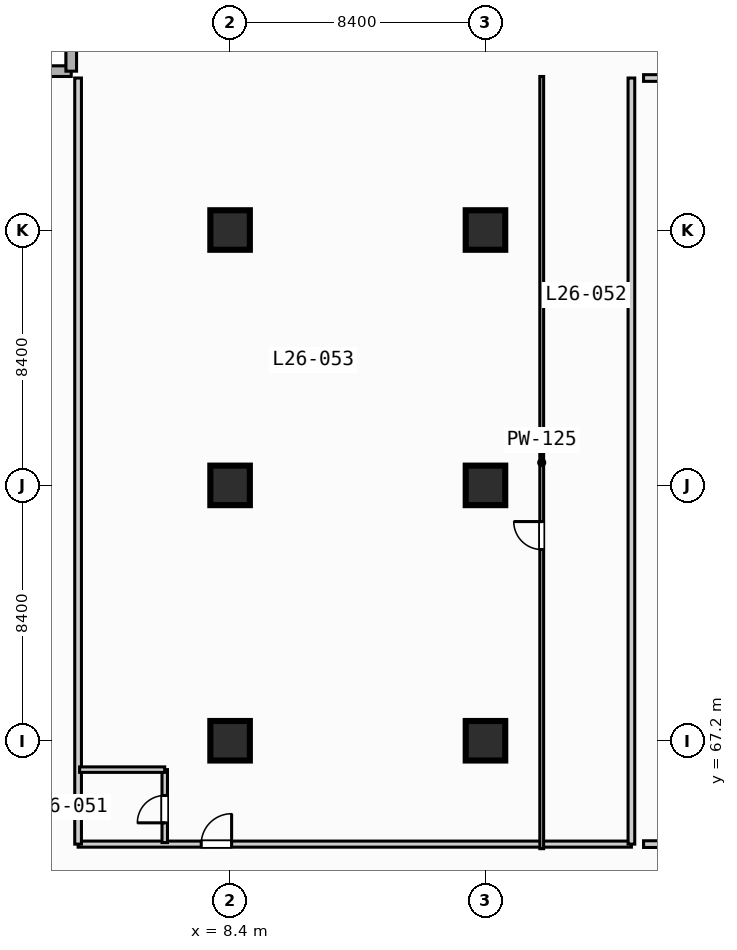
"""IFC4 building model, lengths in metres.
Left out: names, types, materials, properties, quantities, classifications, styles, units other than length and angle.
Written with IfcOpenShell. Run it as: python <this file> out.ifc"""

import sys

from ifc_helpers import new_model, si_unit, direction, frame, frame_2d, origin, origin_2d, place, context, subcontext, project, spatial, rectangle, extrude, element, fill, save


model = new_model("IFC4")
c1 = context("Model", 3, precision=1e-05, world=origin(), true_north=direction((0.0, 1.0)))
c2 = subcontext(c1, "Body", "Model", "MODEL_VIEW")
j1 = project(units=[si_unit("LENGTHUNIT", "METRE"), si_unit("PLANEANGLEUNIT", "RADIAN")], contexts=[c1])
p1 = place(None, origin())
s1 = spatial("IfcSite", under=j1, at=p1, CompositionType="ELEMENT")
p2 = place(p1, origin())
s2 = spatial("IfcBuilding", under=s1, at=p2, CompositionType="ELEMENT")
p3 = place(p2, frame((0.0, 0.0, 111.4)))
s3 = spatial("IfcBuildingStorey", under=s2, at=p3, CompositionType="ELEMENT", Elevation=111.4)
for number, where, z_axis, x_axis in (
    (1, (8.4, 67.2, 0.0), (0.0, 0.0, 1.0), (1.0, 0.0, 0.0)),
    (2, (8.4, 75.6, 0.0), (0.0, 0.0, 1.0), (1.0, 0.0, 0.0)),
    (3, (8.4, 84.0, 0.0), (0.0, 0.0, 1.0), (1.0, 0.0, 0.0)),
    (4, (16.8, 67.2, 0.0), (0.0, 0.0, 1.0), (1.0, 0.0, 0.0)),
    (5, (16.8, 75.6, 0.0), (0.0, 0.0, 1.0), (1.0, 0.0, 0.0)),
    (6, (16.8, 84.0, 0.0), (0.0, 0.0, 1.0), (1.0, 0.0, 0.0)),
):
    element("IfcColumn", number, at=place(p3, frame(where, z_axis=z_axis, x_axis=x_axis)), inside=s3, PredefinedType="COLUMN", context=c2, shape_type="SweptSolid", body=[
        extrude(rectangle(XDim=1.3, YDim=1.3, at=origin_2d()), origin(), (0.0, 0.0, 1.0), 3.8),
    ])
for number, where, z_axis, x_axis in (
    (7, (0.175, 89.225, 0.0), (0.0, 0.0, 1.0), (1.0, 0.0, 0.0)),
    (8, (3.175, 89.225, 0.0), (0.0, 0.0, 1.0), (0.0, 1.0, 0.0)),
):
    element("IfcWall", number, at=place(p3, frame(where, z_axis=z_axis, x_axis=x_axis)), inside=s3, PredefinedType="STANDARD", context=c2, shape_type="SweptSolid", body=[
        extrude(rectangle(XDim=3.0, YDim=0.35, at=frame_2d((1.5, 0.0))), origin(), (0.0, 0.0, 1.0), 3.55),
    ])
p4 = place(p3, frame((3.4, 63.8, 0.0), z_axis=(0.0, 0.0, 1.0), x_axis=(1.0, 0.0, 0.0)))
e9 = element("IfcWall", 9, at=p4, inside=s3, PredefinedType="PARTITIONING", context=c2, shape_type="SweptSolid", body=[
    extrude(rectangle(XDim=18.2, YDim=0.2, at=frame_2d((9.1, 0.0))), origin(), (0.0, 0.0, 1.0), 3.55),
])
p5 = place(p4, frame((4.05, 0.0, 0.0)))
e10 = element("IfcOpeningElement", 10, at=p5, cuts=e9, PredefinedType="OPENING", context=c2, shape_type="SweptSolid", body=[
    extrude(rectangle(XDim=1.0, YDim=2.15, at=frame_2d((0.5, 1.075))), frame((0.0, 0.11, 0.0), z_axis=(0.0, -1.0, 0.0), x_axis=(1.0, 0.0, 0.0)), (0.0, 0.0, 1.0), 0.22),
])
for number, where, z_axis, x_axis in (
    (11, (21.6, 63.8, 0.0), (0.0, 0.0, 1.0), (0.0, 1.0, 0.0)),
    (12, (3.4, 63.8, 0.0), (0.0, 0.0, 1.0), (0.0, 1.0, 0.0)),
):
    element("IfcWall", number, at=place(p3, frame(where, z_axis=z_axis, x_axis=x_axis)), inside=s3, PredefinedType="PARTITIONING", context=c2, shape_type="SweptSolid", body=[
        extrude(rectangle(XDim=25.2, YDim=0.22, at=frame_2d((12.6, 0.0))), origin(), (0.0, 0.0, 1.0), 3.55),
    ])
p6 = place(p3, frame((6.25, 63.85, 0.0), z_axis=(0.0, 0.0, 1.0), x_axis=(0.0, 1.0, 0.0)))
e13 = element("IfcWall", 13, at=p6, inside=s3, PredefinedType="PLUMBINGWALL", context=c2, shape_type="SweptSolid", body=[
    extrude(rectangle(XDim=2.4, YDim=0.18, at=frame_2d((1.2, 0.0))), origin(), (0.0, 0.0, 1.0), 3.55),
])
p7 = place(p6, frame((0.65, 0.0, 0.0)))
e14 = element("IfcOpeningElement", 14, at=p7, cuts=e13, PredefinedType="OPENING", context=c2, shape_type="SweptSolid", body=[
    extrude(rectangle(XDim=0.9, YDim=2.1, at=frame_2d((0.45, 1.05))), frame((0.0, 0.1, 0.0), z_axis=(0.0, -1.0, 0.0), x_axis=(1.0, 0.0, 0.0)), (0.0, 0.0, 1.0), 0.2),
])
p8 = place(p3, frame((3.45, 66.25, 0.0), z_axis=(0.0, 0.0, 1.0), x_axis=(1.0, 0.0, 0.0)))
e15 = element("IfcWall", 15, at=p8, inside=s3, PredefinedType="PLUMBINGWALL", context=c2, shape_type="SweptSolid", body=[
    extrude(rectangle(XDim=2.8, YDim=0.18, at=frame_2d((1.4, 0.0))), origin(), (0.0, 0.0, 1.0), 3.55),
])
p9 = place(p3, frame((18.65, 63.65, 0.0), z_axis=(0.0, 0.0, 1.0), x_axis=(0.0, 1.0, 0.0)))
e16 = element("IfcWall", 16, at=p9, inside=s3, PredefinedType="PARTITIONING", context=c2, shape_type="SweptSolid", body=[
    extrude(rectangle(XDim=25.4, YDim=0.125, at=frame_2d((12.7, 0.0))), origin(), (0.0, 0.0, 1.0), 3.55),
])
p10 = place(p9, frame((9.84, 0.0, 0.0)))
e17 = element("IfcOpeningElement", 17, at=p10, cuts=e16, PredefinedType="OPENING", context=c2, shape_type="SweptSolid", body=[
    extrude(rectangle(XDim=0.92, YDim=2.1, at=frame_2d((0.46, 1.05))), frame((0.0, 0.073, 0.0), z_axis=(0.0, -1.0, 0.0), x_axis=(1.0, 0.0, 0.0)), (0.0, 0.0, 1.0), 0.145),
])
p11 = place(p3, frame((22.0, 89.0, 0.0), z_axis=(0.0, 0.0, 1.0), x_axis=(1.0, 0.0, 0.0)))
e18 = element("IfcWall", 18, at=p11, inside=s3, PredefinedType="PARTITIONING", context=c2, shape_type="SweptSolid", body=[
    extrude(rectangle(XDim=11.3, YDim=0.22, at=frame_2d((5.65, 0.0))), origin(), (0.0, 0.0, 1.0), 3.55),
])
p12 = place(p3, frame((22.0, 63.8, 0.0), z_axis=(0.0, 0.0, 1.0), x_axis=(1.0, 0.0, 0.0)))
e19 = element("IfcWall", 19, at=p12, inside=s3, PredefinedType="PARTITIONING", context=c2, shape_type="SweptSolid", body=[
    extrude(rectangle(XDim=6.0, YDim=0.22, at=frame_2d((3.0, 0.0))), origin(), (0.0, 0.0, 1.0), 3.55),
])
p13 = place(p5, origin())
e20 = element("IfcDoor", 20, at=p13, inside=s3, OperationType="SINGLE_SWING_RIGHT", PredefinedType="DOOR", context=c2, shape_type="SweptSolid", body=[
    extrude(rectangle(XDim=1.0, YDim=2.15, at=frame_2d((0.5, 1.075))), frame((0.0, 0.025, 0.0), z_axis=(0.0, -1.0, 0.0), x_axis=(1.0, 0.0, 0.0)), (0.0, 0.0, 1.0), 0.05),
])
fill(e10, e20)
p14 = place(p7, origin())
e21 = element("IfcDoor", 21, at=p14, inside=s3, OperationType="SINGLE_SWING_LEFT", PredefinedType="DOOR", context=c2, shape_type="SweptSolid", body=[
    extrude(rectangle(XDim=0.9, YDim=2.1, at=frame_2d((0.45, 1.05))), frame((0.0, 0.025, 0.0), z_axis=(0.0, -1.0, 0.0), x_axis=(1.0, 0.0, 0.0)), (0.0, 0.0, 1.0), 0.05),
])
fill(e14, e21)
p15 = place(p10, origin())
e22 = element("IfcDoor", 22, at=p15, inside=s3, OperationType="SINGLE_SWING_RIGHT", PredefinedType="DOOR", context=c2, shape_type="SweptSolid", body=[
    extrude(rectangle(XDim=0.92, YDim=2.1, at=frame_2d((0.46, 1.05))), frame((0.0, 0.025, 0.0), z_axis=(0.0, -1.0, 0.0), x_axis=(1.0, 0.0, 0.0)), (0.0, 0.0, 1.0), 0.05),
])
fill(e17, e22)
save(model, sys.argv[1])
